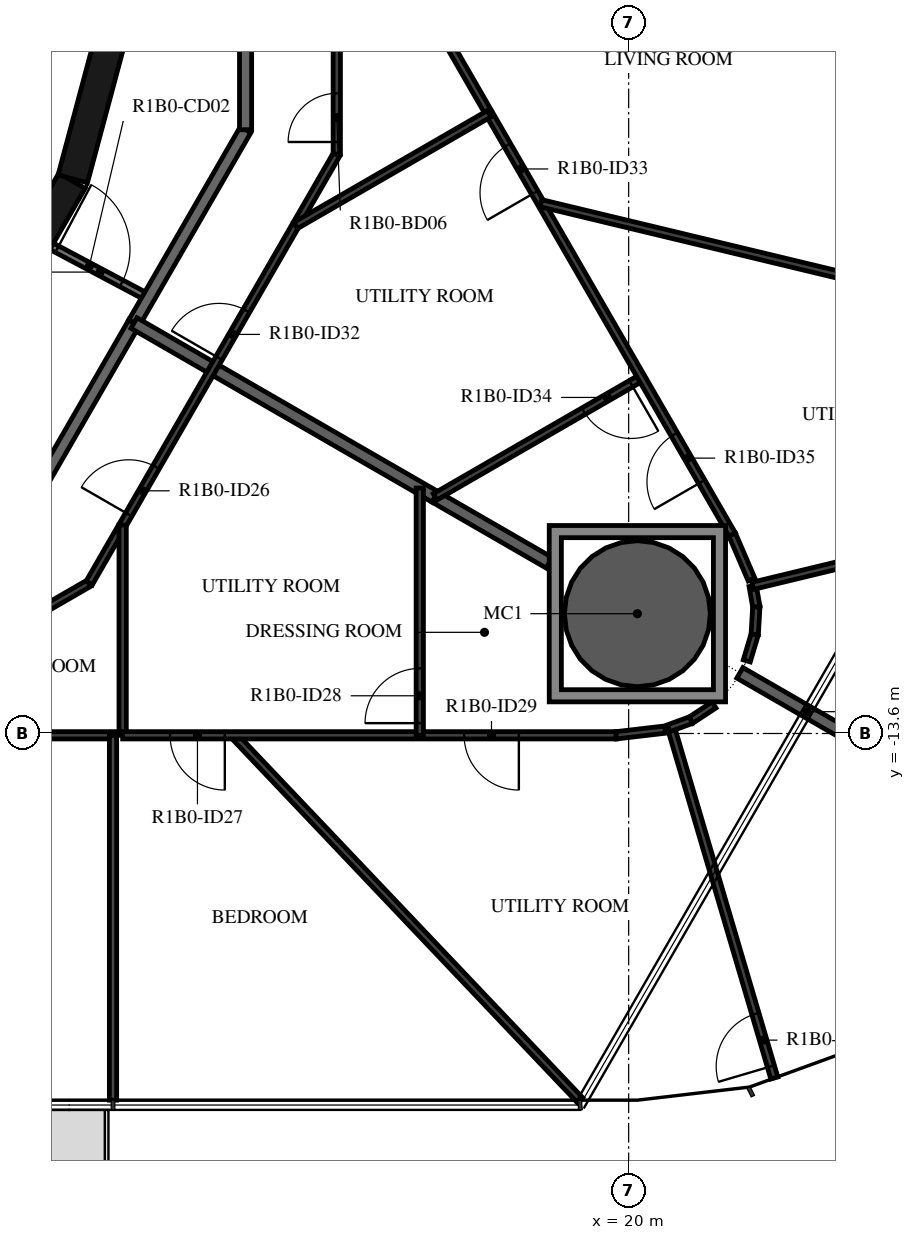
"""IFC4 building model, lengths in metres.
Left out: names, types, materials, properties, quantities, classifications, styles, units other than length and angle.
Written with IfcOpenShell. Run it as: python <this file> out.ifc"""

import sys

from ifc_helpers import new_model, si_unit, direction, frame, frame_2d, origin, origin_2d, place, context, subcontext, project, spatial, polyline, rectangle, hollow_circle, outline, extrude, element, fill, save


model = new_model("IFC4")
c1 = context("Model", 3, precision=1e-05, world=origin(), true_north=direction((0.0, 1.0)))
c2 = subcontext(c1, "Body", "Model", "MODEL_VIEW")
j1 = project(units=[si_unit("LENGTHUNIT", "METRE"), si_unit("PLANEANGLEUNIT", "RADIAN")], contexts=[c1])
p1 = place(None, origin())
s1 = spatial("IfcSite", under=j1, at=p1, CompositionType="ELEMENT")
p2 = place(p1, origin())
s2 = spatial("IfcBuilding", under=s1, at=p2, CompositionType="ELEMENT")
p3 = place(p2, frame((0.0, 0.0, 52.4)))
s3 = spatial("IfcBuildingStorey", under=s2, at=p3, CompositionType="ELEMENT", Elevation=52.4)
p4 = place(p3, frame((20.144, -11.63, -0.38), z_axis=(0.0, 0.0, 1.0), x_axis=(1.0, 0.0, 0.0)))
e1 = element("IfcColumn", 1, at=p4, inside=s3, PredefinedType="COLUMN", context=c2, shape_type="SweptSolid", body=[
    extrude(hollow_circle(Radius=1.2, WallThickness=0.06, at=origin_2d()), origin(), (0.0, 0.0, 1.0), 3.5),
])
for number, where, z_axis, x_axis in (
    (2, (9.329, -7.137, 0.0), (0.0, 0.0, 1.0), (0.5, 0.866, 0.0)),
    (3, (10.858, -4.479, 0.0), (0.0, 0.0, 1.0), (0.259, 0.966, 0.0)),
):
    element("IfcWall", number, at=place(p3, frame(where, z_axis=z_axis, x_axis=x_axis)), inside=s3, PredefinedType="SHEAR", context=c2, shape_type="SweptSolid", body=[
        extrude(rectangle(XDim=3.033, YDim=0.5, at=frame_2d((1.516, 0.0))), origin(), (0.0, 0.0, 1.0), 3.12),
    ])
p5 = place(p3, frame((10.511, -5.589, 0.0), z_axis=(0.0, 0.0, 1.0), x_axis=(0.88294043061, -0.469485032769, 0.0)))
e4 = element("IfcWall", 4, at=p5, inside=s3, PredefinedType="PARTITIONING", context=c2, shape_type="SweptSolid", body=[
    extrude(rectangle(XDim=1.804, YDim=0.12, at=frame_2d((0.902, 0.0))), origin(), (0.0, 0.0, 1.0), 3.12),
])
p6 = place(p5, frame((0.1, 0.0, 0.0)))
e5 = element("IfcOpeningElement", 5, at=p6, cuts=e4, PredefinedType="OPENING", context=c2, shape_type="SweptSolid", body=[
    extrude(rectangle(XDim=1.2, YDim=2.1, at=frame_2d((0.6, 1.05))), frame((0.0, 0.07, 0.0), z_axis=(0.0, -1.0, 0.0), x_axis=(1.0, 0.0, 0.0)), (0.0, 0.0, 1.0), 0.14),
])
p7 = place(p3, frame((11.865, -6.85, 0.0), z_axis=(0.0, 0.0, 1.0), x_axis=(0.499987270552, 0.86603275301, 0.0)))
e6 = element("IfcWall", 6, at=p7, inside=s3, PredefinedType="STANDARD", context=c2, shape_type="SweptSolid", body=[
    extrude(rectangle(XDim=3.671, YDim=0.2, at=frame_2d((1.835, 0.0))), origin(), (0.0, 0.0, 1.0), 3.12),
])
p8 = place(p3, frame((13.7, -3.671, 0.0), z_axis=(0.0, 0.0, 1.0), x_axis=(0.0, 1.0, 0.0)))
e7 = element("IfcWall", 7, at=p8, inside=s3, PredefinedType="STANDARD", context=c2, shape_type="SweptSolid", body=[
    extrude(rectangle(XDim=7.146, YDim=0.2, at=frame_2d((3.573, 0.0))), origin(), (0.0, 0.0, 1.0), 3.12),
])
p9 = place(p8, frame((5.947, 0.0, 0.0)))
e8 = element("IfcOpeningElement", 8, at=p9, cuts=e7, PredefinedType="OPENING", context=c2, shape_type="SweptSolid", body=[
    extrude(rectangle(XDim=1.0, YDim=2.1, at=frame_2d((0.5, 1.05))), frame((0.0, 0.11, 0.0), z_axis=(0.0, -1.0, 0.0), x_axis=(1.0, 0.0, 0.0)), (0.0, 0.0, 1.0), 0.22),
])
p10 = place(p3, frame((10.029, -10.029, 0.0), z_axis=(0.0, 0.0, 1.0), x_axis=(0.50001606911, 0.866016126081, 0.0)))
e9 = element("IfcWall", 9, at=p10, inside=s3, PredefinedType="STANDARD", context=c2, shape_type="SweptSolid", body=[
    extrude(rectangle(XDim=3.671, YDim=0.2, at=frame_2d((1.835, 0.0))), origin(), (0.0, 0.0, 1.0), 3.12),
])
p11 = place(p3, frame((16.817, -9.709, 0.0), z_axis=(0.0, 0.0, 1.0), x_axis=(-0.86604338933, 0.499968846828, 0.0)))
e10 = element("IfcWall", 10, at=p11, inside=s3, PredefinedType="STANDARD", context=c2, shape_type="SweptSolid", body=[
    extrude(rectangle(XDim=5.718, YDim=0.2, at=frame_2d((2.859, 0.0))), origin(), (0.0, 0.0, 1.0), 3.12),
])
p12 = place(p3, frame((27.025, -15.603, 0.0), z_axis=(0.0, 0.0, 1.0), x_axis=(-0.866020924479, 0.500007758305, 0.0)))
e11 = element("IfcWall", 11, at=p12, inside=s3, PredefinedType="STANDARD", context=c2, shape_type="SweptSolid", body=[
    extrude(rectangle(XDim=6.0, YDim=0.2, at=frame_2d((3.0, 0.0))), origin(), (0.0, 0.0, 1.0), 3.12),
])
p13 = place(p3, frame((18.694, -10.793, 0.0), z_axis=(0.0, 0.0, 1.0), x_axis=(-0.866009251978, 0.500027974705, 0.0)))
e12 = element("IfcWall", 12, at=p13, inside=s3, PredefinedType="STANDARD", context=c2, shape_type="SweptSolid", body=[
    extrude(rectangle(XDim=2.167, YDim=0.2, at=frame_2d((1.084, 0.0))), origin(), (0.0, 0.0, 1.0), 3.12),
])
p14 = place(p3, frame((4.613, -14.888, 0.0), z_axis=(0.0, 0.0, 1.0), x_axis=(0.866025608725, 0.499999645032, 0.0)))
e13 = element("IfcWall", 13, at=p14, inside=s3, PredefinedType="PARTITIONING", context=c2, shape_type="SweptSolid", body=[
    extrude(rectangle(XDim=7.522, YDim=0.12, at=frame_2d((3.761, 0.0))), origin(), (0.0, 0.0, 1.0), 3.12),
])
p15 = place(p14, frame((4.017, 0.0, 0.0)))
e14 = element("IfcOpeningElement", 14, at=p15, cuts=e13, PredefinedType="OPENING", context=c2, shape_type="SweptSolid", body=[
    extrude(rectangle(XDim=0.8, YDim=2.1, at=frame_2d((0.4, 1.05))), frame((0.0, 0.07, 0.0), z_axis=(0.0, -1.0, 0.0), x_axis=(1.0, 0.0, 0.0)), (0.0, 0.0, 1.0), 0.14),
])
p16 = place(p3, frame((11.127, -11.127, 0.0), z_axis=(0.0, 0.0, 1.0), x_axis=(0.499987950692, 0.866032360344, 0.0)))
e15 = element("IfcWall", 15, at=p16, inside=s3, PredefinedType="PARTITIONING", context=c2, shape_type="SweptSolid", body=[
    extrude(rectangle(XDim=8.146, YDim=0.12, at=frame_2d((4.073, 0.0))), origin(), (0.0, 0.0, 1.0), 3.12),
])
p17 = place(p16, frame((1.303, 0.0, 0.0)))
e16 = element("IfcOpeningElement", 16, at=p17, cuts=e15, PredefinedType="OPENING", context=c2, shape_type="SweptSolid", body=[
    extrude(rectangle(XDim=0.9, YDim=2.1, at=frame_2d((0.45, 1.05))), frame((0.0, 0.07, 0.0), z_axis=(0.0, -1.0, 0.0), x_axis=(1.0, 0.0, 0.0)), (0.0, 0.0, 1.0), 0.14),
])
p18 = place(p16, frame((4.273, 0.0, 0.0)))
e17 = element("IfcOpeningElement", 17, at=p18, cuts=e15, PredefinedType="OPENING", context=c2, shape_type="SweptSolid", body=[
    extrude(rectangle(XDim=0.9, YDim=2.1, at=frame_2d((0.45, 1.05))), frame((0.0, 0.07, 0.0), z_axis=(0.0, -1.0, 0.0), x_axis=(1.0, 0.0, 0.0)), (0.0, 0.0, 1.0), 0.14),
])
p19 = place(p3, frame((11.56, -13.63, 0.0), z_axis=(0.0, 0.0, 1.0), x_axis=(-1.0, 0.0, 0.0)))
e18 = element("IfcWall", 18, at=p19, inside=s3, PredefinedType="PARTITIONING", context=c2, shape_type="SweptSolid", body=[
    extrude(rectangle(XDim=4.768, YDim=0.12, at=frame_2d((2.384, 0.0))), origin(), (0.0, 0.0, 1.0), 3.12),
])
p20 = place(p3, frame((11.52, -19.63, 0.0), z_axis=(0.0, 0.0, 1.0), x_axis=(0.0, 1.0, 0.0)))
e19 = element("IfcWall", 19, at=p20, inside=s3, PredefinedType="PARTITIONING", context=c2, shape_type="SweptSolid", body=[
    extrude(rectangle(XDim=6.0, YDim=0.12, at=frame_2d((3.0, 0.0))), origin(), (0.0, 0.0, 1.0), 2.73),
])
p21 = place(p3, frame((11.678, -13.63, 0.0), z_axis=(0.0, 0.0, 1.0), x_axis=(0.0, 1.0, 0.0)))
e20 = element("IfcWall", 20, at=p21, inside=s3, PredefinedType="PARTITIONING", context=c2, shape_type="SweptSolid", body=[
    extrude(rectangle(XDim=3.458, YDim=0.12, at=frame_2d((1.729, 0.0))), origin(), (0.0, 0.0, 1.0), 3.12),
])
p22 = place(p3, frame((19.2, -19.63, 0.0), z_axis=(0.0, 0.0, 1.0), x_axis=(-0.688544699396, 0.72519390299, 0.0)))
e21 = element("IfcWall", 21, at=p22, inside=s3, PredefinedType="PARTITIONING", context=c2, shape_type="SweptSolid", body=[
    extrude(rectangle(XDim=8.274, YDim=0.12, at=frame_2d((4.137, 0.0))), origin(), (0.0, 0.0, 1.0), 3.12),
])
p23 = place(p3, frame((19.794, -13.63, 0.0), z_axis=(0.0, 0.0, 1.0), x_axis=(-1.0, 0.0, 0.0)))
e22 = element("IfcWall", 22, at=p23, inside=s3, PredefinedType="PARTITIONING", context=c2, shape_type="SweptSolid", body=[
    extrude(rectangle(XDim=8.116, YDim=0.12, at=frame_2d((4.058, 0.0))), origin(), (0.0, 0.0, 1.0), 3.12),
])
p24 = place(p23, frame((6.436, 0.0, 0.0)))
e23 = element("IfcOpeningElement", 23, at=p24, cuts=e22, PredefinedType="OPENING", context=c2, shape_type="SweptSolid", body=[
    extrude(rectangle(XDim=0.9, YDim=2.1, at=frame_2d((0.45, 1.05))), frame((0.0, 0.07, 0.0), z_axis=(0.0, -1.0, 0.0), x_axis=(1.0, 0.0, 0.0)), (0.0, 0.0, 1.0), 0.14),
])
p25 = place(p23, frame((1.6, 0.0, 0.0)))
e24 = element("IfcOpeningElement", 24, at=p25, cuts=e22, PredefinedType="OPENING", context=c2, shape_type="SweptSolid", body=[
    extrude(rectangle(XDim=0.9, YDim=2.1, at=frame_2d((0.45, 1.05))), frame((0.0, 0.07, 0.0), z_axis=(0.0, -1.0, 0.0), x_axis=(1.0, 0.0, 0.0)), (0.0, 0.0, 1.0), 0.14),
])
p26 = place(p3, frame((22.396, -19.266, 0.0), z_axis=(0.0, 0.0, 1.0), x_axis=(-0.282896205585, 0.959150528783, 0.0)))
e25 = element("IfcWall", 25, at=p26, inside=s3, PredefinedType="PARTITIONING", context=c2, shape_type="SweptSolid", body=[
    extrude(rectangle(XDim=6.012, YDim=0.12, at=frame_2d((3.006, 0.0))), origin(), (0.0, 0.0, 1.0), 3.12),
])
p27 = place(p26, frame((0.2, 0.0, 0.0)))
e26 = element("IfcOpeningElement", 26, at=p27, cuts=e25, PredefinedType="OPENING", context=c2, shape_type="SweptSolid", body=[
    extrude(rectangle(XDim=0.9, YDim=2.1, at=frame_2d((0.45, 1.05))), frame((0.0, 0.07, 0.0), z_axis=(0.0, -1.0, 0.0), x_axis=(1.0, 0.0, 0.0)), (0.0, 0.0, 1.0), 0.14),
])
p28 = place(p3, frame((20.595, -13.536, 0.0), z_axis=(0.0, 0.0, 1.0), x_axis=(-0.993259655268, -0.115910556968, 0.0)))
e27 = element("IfcWall", 27, at=p28, inside=s3, PredefinedType="PARTITIONING", context=c2, shape_type="SweptSolid", body=[
    extrude(rectangle(XDim=0.807, YDim=0.12, at=frame_2d((0.403, 0.0))), origin(), (0.0, 0.0, 1.0), 3.12),
])
p29 = place(p3, frame((16.565, -13.63, 0.0), z_axis=(0.0, 0.0, 1.0), x_axis=(0.0, 1.0, 0.0)))
e28 = element("IfcWall", 28, at=p29, inside=s3, PredefinedType="PARTITIONING", context=c2, shape_type="SweptSolid", body=[
    extrude(rectangle(XDim=4.066, YDim=0.12, at=frame_2d((2.033, 0.0))), origin(), (0.0, 0.0, 1.0), 3.12),
])
p30 = place(p29, frame((0.2, 0.0, 0.0)))
e29 = element("IfcOpeningElement", 29, at=p30, cuts=e28, PredefinedType="OPENING", context=c2, shape_type="SweptSolid", body=[
    extrude(rectangle(XDim=0.9, YDim=2.1, at=frame_2d((0.45, 1.05))), frame((0.0, 0.07, 0.0), z_axis=(0.0, -1.0, 0.0), x_axis=(1.0, 0.0, 0.0)), (0.0, 0.0, 1.0), 0.14),
])
p31 = place(p3, frame((21.403, -13.131, 0.0), z_axis=(0.0, 0.0, 1.0), x_axis=(-0.835339231854, -0.549734815821, 0.0)))
e30 = element("IfcWall", 30, at=p31, inside=s3, PredefinedType="PARTITIONING", context=c2, shape_type="SweptSolid", body=[
    extrude(rectangle(XDim=0.455, YDim=0.12, at=frame_2d((0.228, 0.0))), origin(), (0.0, 0.0, 1.0), 3.12),
])
p32 = place(p3, frame((21.023, -13.381, 0.0), z_axis=(0.0, 0.0, 1.0), x_axis=(-0.939665068469, -0.34209583321, 0.0)))
e31 = element("IfcWall", 31, at=p32, inside=s3, PredefinedType="PARTITIONING", context=c2, shape_type="SweptSolid", body=[
    extrude(rectangle(XDim=0.389, YDim=0.12, at=frame_2d((0.194, 0.0))), origin(), (0.0, 0.0, 1.0), 3.12),
])
p33 = place(p3, frame((15.2, -4.073, 0.0), z_axis=(0.0, 0.0, 1.0), x_axis=(0.0, 1.0, 0.0)))
e32 = element("IfcWall", 32, at=p33, inside=s3, PredefinedType="PARTITIONING", context=c2, shape_type="SweptSolid", body=[
    extrude(rectangle(XDim=5.005, YDim=0.12, at=frame_2d((2.503, 0.0))), origin(), (0.0, 0.0, 1.0), 3.12),
])
p34 = place(p33, frame((0.2, 0.0, 0.0)))
e33 = element("IfcOpeningElement", 33, at=p34, cuts=e32, PredefinedType="OPENING", context=c2, shape_type="SweptSolid", body=[
    extrude(rectangle(XDim=0.8, YDim=2.1, at=frame_2d((0.4, 1.05))), frame((0.0, 0.07, 0.0), z_axis=(0.0, -1.0, 0.0), x_axis=(1.0, 0.0, 0.0)), (0.0, 0.0, 1.0), 0.14),
])
p35 = place(p3, frame((21.942, -12.406, 0.0), z_axis=(0.0, 0.0, 1.0), x_axis=(0.287101711529, 0.957900102953, 0.0)))
e34 = element("IfcWall", 34, at=p35, inside=s3, PredefinedType="PARTITIONING", context=c2, shape_type="SweptSolid", body=[
    extrude(rectangle(XDim=0.455, YDim=0.12, at=frame_2d((0.228, 0.0))), origin(), (0.0, 0.0, 1.0), 3.12),
])
p36 = place(p3, frame((22.073, -11.97, 0.0), z_axis=(0.0, 0.0, 1.0), x_axis=(0.058533144572, 0.998285465679, 0.0)))
e35 = element("IfcWall", 35, at=p36, inside=s3, PredefinedType="PARTITIONING", context=c2, shape_type="SweptSolid", body=[
    extrude(rectangle(XDim=0.455, YDim=0.12, at=frame_2d((0.227, 0.0))), origin(), (0.0, 0.0, 1.0), 3.12),
])
p37 = place(p3, frame((22.1, -11.516, 0.0), z_axis=(0.0, 0.0, 1.0), x_axis=(-0.174264410128, 0.984698895786, 0.0)))
e36 = element("IfcWall", 36, at=p37, inside=s3, PredefinedType="PARTITIONING", context=c2, shape_type="SweptSolid", body=[
    extrude(rectangle(XDim=0.349, YDim=0.12, at=frame_2d((0.174, 0.0))), origin(), (0.0, 0.0, 1.0), 3.12),
])
p38 = place(p3, frame((20.212, -7.749, 0.0), z_axis=(0.0, 0.0, 1.0), x_axis=(-0.86604663799, -0.499963219473, 0.0)))
e37 = element("IfcWall", 37, at=p38, inside=s3, PredefinedType="PARTITIONING", context=c2, shape_type="SweptSolid", body=[
    extrude(rectangle(XDim=3.921, YDim=0.12, at=frame_2d((1.96, 0.0))), origin(), (0.0, 0.0, 1.0), 3.12),
])
p39 = place(p38, frame((0.2, 0.0, 0.0)))
e38 = element("IfcOpeningElement", 38, at=p39, cuts=e37, PredefinedType="OPENING", context=c2, shape_type="SweptSolid", body=[
    extrude(rectangle(XDim=0.9, YDim=2.1, at=frame_2d((0.45, 1.05))), frame((0.0, 0.07, 0.0), z_axis=(0.0, -1.0, 0.0), x_axis=(1.0, 0.0, 0.0)), (0.0, 0.0, 1.0), 0.14),
])
p40 = place(p3, frame((22.021, -11.068, 0.0), z_axis=(0.0, 0.0, 1.0), x_axis=(-0.396036092975, 0.918234944369, 0.0)))
e39 = element("IfcWall", 39, at=p40, inside=s3, PredefinedType="PARTITIONING", context=c2, shape_type="SweptSolid", body=[
    extrude(rectangle(XDim=0.807, YDim=0.12, at=frame_2d((0.403, 0.0))), origin(), (0.0, 0.0, 1.0), 3.12),
])
p41 = place(p3, frame((21.701, -10.327, 0.0), z_axis=(0.0, 0.0, 1.0), x_axis=(-0.500008528526, 0.866020479782, 0.0)))
e40 = element("IfcWall", 40, at=p41, inside=s3, PredefinedType="PARTITIONING", context=c2, shape_type="SweptSolid", body=[
    extrude(rectangle(XDim=13.002, YDim=0.12, at=frame_2d((6.501, 0.0))), origin(), (0.0, 0.0, 1.0), 3.12),
])
p42 = place(p41, frame((6.49, 0.0, 0.0)))
e41 = element("IfcOpeningElement", 41, at=p42, cuts=e40, PredefinedType="OPENING", context=c2, shape_type="SweptSolid", body=[
    extrude(rectangle(XDim=0.9, YDim=2.1, at=frame_2d((0.45, 1.05))), frame((0.0, 0.07, 0.0), z_axis=(0.0, -1.0, 0.0), x_axis=(1.0, 0.0, 0.0)), (0.0, 0.0, 1.0), 0.14),
])
p43 = place(p41, frame((1.0, 0.0, 0.0)))
e42 = element("IfcOpeningElement", 42, at=p43, cuts=e40, PredefinedType="OPENING", context=c2, shape_type="SweptSolid", body=[
    extrude(rectangle(XDim=0.9, YDim=2.1, at=frame_2d((0.45, 1.05))), frame((0.0, 0.07, 0.0), z_axis=(0.0, -1.0, 0.0), x_axis=(1.0, 0.0, 0.0)), (0.0, 0.0, 1.0), 0.14),
])
p44 = place(p3, frame((27.883, -9.762, 0.0), z_axis=(0.0, 0.0, 1.0), x_axis=(-0.972090512558, -0.234606128213, 0.0)))
e43 = element("IfcWall", 43, at=p44, inside=s3, PredefinedType="PARTITIONING", context=c2, shape_type="SweptSolid", body=[
    extrude(rectangle(XDim=6.012, YDim=0.12, at=frame_2d((3.006, 0.0))), origin(), (0.0, 0.0, 1.0), 3.12),
])
p45 = place(p44, frame((0.2, 0.0, 0.0)))
e44 = element("IfcOpeningElement", 44, at=p45, cuts=e43, PredefinedType="OPENING", context=c2, shape_type="SweptSolid", body=[
    extrude(rectangle(XDim=0.9, YDim=2.1, at=frame_2d((0.45, 1.05))), frame((0.0, 0.07, 0.0), z_axis=(0.0, -1.0, 0.0), x_axis=(1.0, 0.0, 0.0)), (0.0, 0.0, 1.0), 0.14),
])
p46 = place(p3, frame((17.706, -3.408, 0.0), z_axis=(0.0, 0.0, 1.0), x_axis=(-0.866027421574, -0.49999650507, 0.0)))
e45 = element("IfcWall", 45, at=p46, inside=s3, PredefinedType="PARTITIONING", context=c2, shape_type="SweptSolid", body=[
    extrude(rectangle(XDim=3.676, YDim=0.12, at=frame_2d((1.838, 0.0))), origin(), (0.0, 0.0, 1.0), 3.12),
])
p47 = place(p3, frame((26.6, -6.813, 0.0), z_axis=(0.0, 0.0, 1.0), x_axis=(-0.972306888212, 0.233707755831, 0.0)))
e46 = element("IfcWall", 46, at=p47, inside=s3, PredefinedType="PARTITIONING", context=c2, shape_type="SweptSolid", body=[
    extrude(rectangle(XDim=8.273, YDim=0.12, at=frame_2d((4.137, 0.0))), origin(), (0.0, 0.0, 1.0), 3.12),
])
p48 = place(p3, origin())
e47 = element("IfcWall", 47, at=p48, inside=s3, PredefinedType="STANDARD", context=c2, shape_type="SweptSolid", body=[
    extrude(outline(polyline([(21.594, -10.18), (21.594, -13.08), (18.694, -13.08), (18.694, -10.18), (21.594, -10.18)]), holes=[polyline([(18.894, -12.88), (21.394, -12.88), (21.394, -10.38), (18.894, -10.38), (18.894, -12.88)])]), origin(), (0.0, 0.0, 1.0), 3.12),
])
p49 = place(p17, origin())
e48 = element("IfcDoor", 48, at=p49, inside=s3, OperationType="SINGLE_SWING_RIGHT", PredefinedType="DOOR", context=c2, shape_type="SweptSolid", body=[
    extrude(rectangle(XDim=0.9, YDim=2.1, at=frame_2d((0.45, 1.05))), frame((0.0, 0.025, 0.0), z_axis=(0.0, -1.0, 0.0), x_axis=(1.0, 0.0, 0.0)), (0.0, 0.0, 1.0), 0.05),
])
fill(e16, e48)
p50 = place(p24, origin())
e49 = element("IfcDoor", 49, at=p50, inside=s3, OperationType="SINGLE_SWING_RIGHT", PredefinedType="DOOR", context=c2, shape_type="SweptSolid", body=[
    extrude(rectangle(XDim=0.9, YDim=2.1, at=frame_2d((0.45, 1.05))), frame((0.0, 0.025, 0.0), z_axis=(0.0, -1.0, 0.0), x_axis=(1.0, 0.0, 0.0)), (0.0, 0.0, 1.0), 0.05),
])
fill(e23, e49)
p51 = place(p30, origin())
e50 = element("IfcDoor", 50, at=p51, inside=s3, OperationType="SINGLE_SWING_RIGHT", PredefinedType="DOOR", context=c2, shape_type="SweptSolid", body=[
    extrude(rectangle(XDim=0.9, YDim=2.1, at=frame_2d((0.45, 1.05))), frame((0.0, 0.025, 0.0), z_axis=(0.0, -1.0, 0.0), x_axis=(1.0, 0.0, 0.0)), (0.0, 0.0, 1.0), 0.05),
])
fill(e29, e50)
p52 = place(p25, origin())
e51 = element("IfcDoor", 51, at=p52, inside=s3, OperationType="SINGLE_SWING_RIGHT", PredefinedType="DOOR", context=c2, shape_type="SweptSolid", body=[
    extrude(rectangle(XDim=0.9, YDim=2.1, at=frame_2d((0.45, 1.05))), frame((0.0, 0.025, 0.0), z_axis=(0.0, -1.0, 0.0), x_axis=(1.0, 0.0, 0.0)), (0.0, 0.0, 1.0), 0.05),
])
fill(e24, e51)
p53 = place(p27, origin())
e52 = element("IfcDoor", 52, at=p53, inside=s3, OperationType="SINGLE_SWING_RIGHT", PredefinedType="DOOR", context=c2, shape_type="SweptSolid", body=[
    extrude(rectangle(XDim=0.9, YDim=2.1, at=frame_2d((0.45, 1.05))), frame((0.0, 0.025, 0.0), z_axis=(0.0, -1.0, 0.0), x_axis=(1.0, 0.0, 0.0)), (0.0, 0.0, 1.0), 0.05),
])
fill(e26, e52)
p54 = place(p18, origin())
e53 = element("IfcDoor", 53, at=p54, inside=s3, OperationType="SINGLE_SWING_LEFT", PredefinedType="DOOR", context=c2, shape_type="SweptSolid", body=[
    extrude(rectangle(XDim=0.9, YDim=2.1, at=frame_2d((0.45, 1.05))), frame((0.0, 0.025, 0.0), z_axis=(0.0, -1.0, 0.0), x_axis=(1.0, 0.0, 0.0)), (0.0, 0.0, 1.0), 0.05),
])
fill(e17, e53)
p55 = place(p34, origin())
e54 = element("IfcDoor", 54, at=p55, inside=s3, OperationType="SINGLE_SWING_LEFT", PredefinedType="DOOR", context=c2, shape_type="SweptSolid", body=[
    extrude(rectangle(XDim=0.8, YDim=2.1, at=frame_2d((0.4, 1.05))), frame((0.0, 0.025, 0.0), z_axis=(0.0, -1.0, 0.0), x_axis=(1.0, 0.0, 0.0)), (0.0, 0.0, 1.0), 0.05),
])
fill(e33, e54)
p56 = place(p42, origin())
e55 = element("IfcDoor", 55, at=p56, inside=s3, OperationType="SINGLE_SWING_LEFT", PredefinedType="DOOR", context=c2, shape_type="SweptSolid", body=[
    extrude(rectangle(XDim=0.9, YDim=2.1, at=frame_2d((0.45, 1.05))), frame((0.0, 0.025, 0.0), z_axis=(0.0, -1.0, 0.0), x_axis=(1.0, 0.0, 0.0)), (0.0, 0.0, 1.0), 0.05),
])
fill(e41, e55)
p57 = place(p39, origin())
e56 = element("IfcDoor", 56, at=p57, inside=s3, OperationType="SINGLE_SWING_LEFT", PredefinedType="DOOR", context=c2, shape_type="SweptSolid", body=[
    extrude(rectangle(XDim=0.9, YDim=2.1, at=frame_2d((0.45, 1.05))), frame((0.0, 0.025, 0.0), z_axis=(0.0, -1.0, 0.0), x_axis=(1.0, 0.0, 0.0)), (0.0, 0.0, 1.0), 0.05),
])
fill(e38, e56)
p58 = place(p43, origin())
e57 = element("IfcDoor", 57, at=p58, inside=s3, OperationType="SINGLE_SWING_LEFT", PredefinedType="DOOR", context=c2, shape_type="SweptSolid", body=[
    extrude(rectangle(XDim=0.9, YDim=2.1, at=frame_2d((0.45, 1.05))), frame((0.0, 0.025, 0.0), z_axis=(0.0, -1.0, 0.0), x_axis=(1.0, 0.0, 0.0)), (0.0, 0.0, 1.0), 0.05),
])
fill(e42, e57)
p59 = place(p6, origin())
e58 = element("IfcDoor", 58, at=p59, inside=s3, OperationType="DOUBLE_DOOR_SINGLE_SWING", PredefinedType="DOOR", context=c2, shape_type="SweptSolid", body=[
    extrude(rectangle(XDim=1.2, YDim=2.1, at=frame_2d((0.6, 1.05))), frame((0.0, 0.025, 0.0), z_axis=(0.0, -1.0, 0.0), x_axis=(1.0, 0.0, 0.0)), (0.0, 0.0, 1.0), 0.05),
])
fill(e5, e58)
save(model, sys.argv[1])
